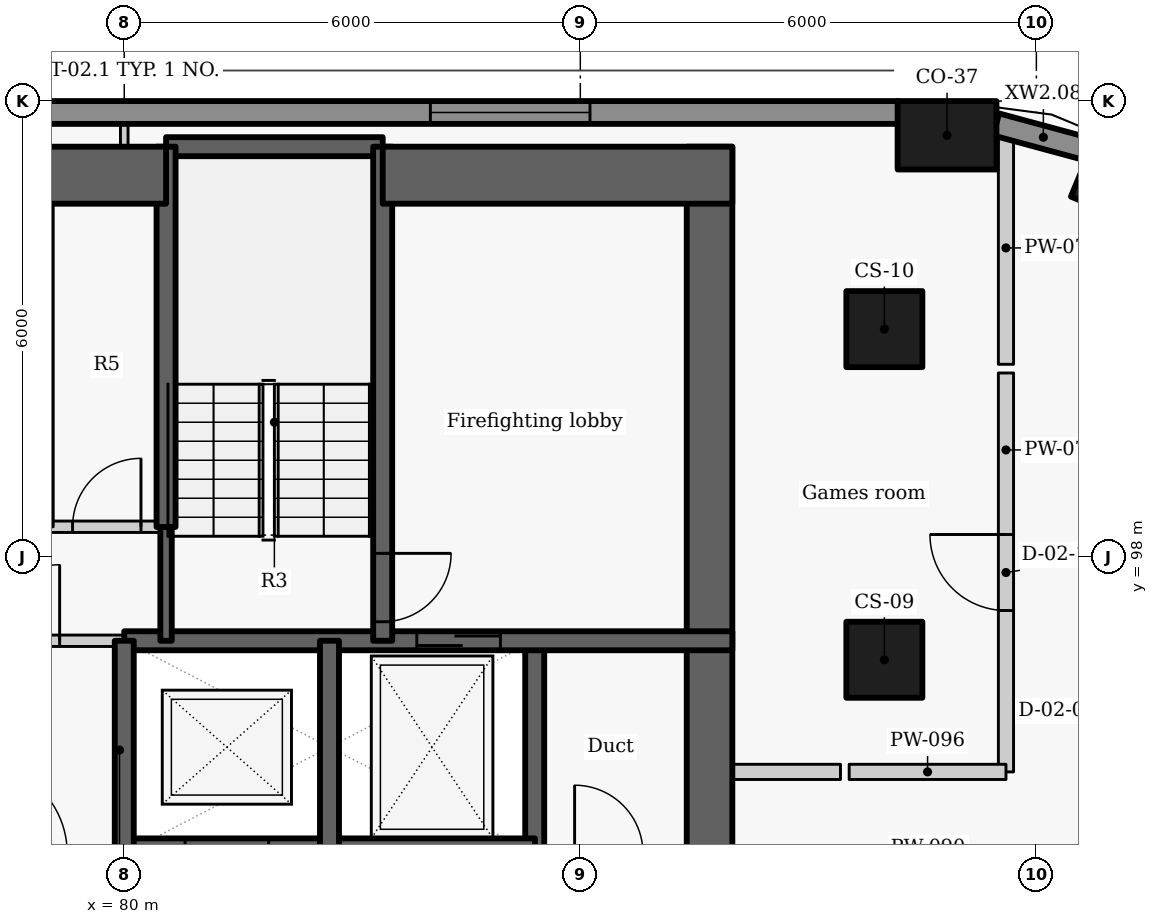
"""IFC4 building model, lengths in metres.
Left out: names, types, materials, properties, quantities, classifications, styles, units other than length and angle.
Written with IfcOpenShell. Run it as: python <this file> out.ifc"""

import sys

from ifc_helpers import new_model, si_unit, direction, frame, frame_2d, origin, origin_2d, place, context, subcontext, project, spatial, rectangle, extrude, element, fill, save


model = new_model("IFC4")
c1 = context("Model", 3, precision=1e-05, world=origin(), true_north=direction((0.0, 1.0)))
c2 = subcontext(c1, "Body", "Model", "MODEL_VIEW")
j1 = project(units=[si_unit("LENGTHUNIT", "METRE"), si_unit("PLANEANGLEUNIT", "RADIAN")], contexts=[c1])
p1 = place(None, origin())
s1 = spatial("IfcSite", under=j1, at=p1, CompositionType="ELEMENT")
p2 = place(p1, origin())
s2 = spatial("IfcBuilding", under=s1, at=p2, CompositionType="ELEMENT")
p3 = place(p2, frame((0.0, 0.0, 150.3)))
s3 = spatial("IfcBuildingStorey", under=s2, at=p3, CompositionType="ELEMENT", Elevation=150.3)
for number, where, z_axis, x_axis in (
    (1, (93.227, 102.91, 0.0), (0.0, 0.0, 1.0), (-0.924, 0.383, 0.0)),
    (2, (90.825, 103.55, 0.0), (0.0, 0.0, 1.0), (-1.0, 0.0, 0.0)),
):
    element("IfcColumn", number, at=place(p3, frame(where, z_axis=z_axis, x_axis=x_axis)), inside=s3, PredefinedType="COLUMN", context=c2, shape_type="SweptSolid", body=[
        extrude(rectangle(XDim=1.3, YDim=0.9, at=origin_2d()), origin(), (0.0, 0.0, 1.0), 3.3),
    ])
for number, where, z_axis, x_axis in (
    (3, (90.0, 96.65, 0.0), (0.0, 0.0, 1.0), (0.0, 1.0, 0.0)),
    (4, (90.0, 101.0, 0.0), (0.0, 0.0, 1.0), (0.0, 1.0, 0.0)),
):
    element("IfcColumn", number, at=place(p3, frame(where, z_axis=z_axis, x_axis=x_axis)), inside=s3, PredefinedType="COLUMN", context=c2, shape_type="SweptSolid", body=[
        extrude(rectangle(XDim=1.0, YDim=1.0, at=origin_2d()), origin(), (0.0, 0.0, 1.0), 3.3),
    ])
p4 = place(p3, frame((92.713, 103.356, 0.0), z_axis=(0.0, 0.0, 1.0), x_axis=(-0.965274225809, 0.26123872031, 0.0)))
e5 = element("IfcWall", 5, at=p4, inside=s3, PredefinedType="SOLIDWALL", context=c2, shape_type="SweptSolid", body=[
    extrude(rectangle(XDim=1.287, YDim=0.3, at=frame_2d((0.644, 0.0))), origin(), (0.0, 0.0, 1.0), 2.425),
])
p5 = place(p3, frame((90.179, 103.85, 0.0), z_axis=(0.0, 0.0, 1.0), x_axis=(-1.0, 0.0, 0.0)))
e6 = element("IfcWall", 6, at=p5, inside=s3, PredefinedType="SOLIDWALL", context=c2, shape_type="SweptSolid", body=[
    extrude(rectangle(XDim=20.391, YDim=0.3, at=frame_2d((10.196, 0.0))), origin(), (0.0, 0.0, 1.0), 2.425),
])
p6 = place(p5, frame((4.051, 0.0, 0.9)))
e7 = element("IfcOpeningElement", 7, at=p6, cuts=e6, PredefinedType="OPENING", context=c2, shape_type="SweptSolid", body=[
    extrude(rectangle(XDim=2.1, YDim=1.1, at=frame_2d((1.05, 0.55))), frame((0.0, 0.16, 0.0), z_axis=(0.0, -1.0, 0.0), x_axis=(1.0, 0.0, 0.0)), (0.0, 0.0, 1.0), 0.32),
])
p7 = place(p5, frame((14.212, 0.0, 0.9)))
e8 = element("IfcOpeningElement", 8, at=p7, cuts=e6, PredefinedType="OPENING", context=c2, shape_type="SweptSolid", body=[
    extrude(rectangle(XDim=2.1, YDim=1.1, at=frame_2d((1.05, 0.55))), frame((0.0, 0.16, 0.0), z_axis=(0.0, -1.0, 0.0), x_axis=(1.0, 0.0, 0.0)), (0.0, 0.0, 1.0), 0.32),
])
p8 = place(p3, frame((85.4, 94.1, -0.275), z_axis=(0.0, 0.0, 1.0), x_axis=(0.0, 1.0, 0.0)))
e9 = element("IfcWall", 9, at=p8, inside=s3, PredefinedType="SHEAR", context=c2, shape_type="SweptSolid", body=[
    extrude(rectangle(XDim=2.8, YDim=0.25, at=frame_2d((1.4, 0.0))), origin(), (0.0, 0.0, 1.0), 3.3),
])
p9 = place(p3, frame((87.7, 103.4, -0.275), z_axis=(0.0, 0.0, 1.0), x_axis=(0.0, -1.0, 0.0)))
e10 = element("IfcWall", 10, at=p9, inside=s3, PredefinedType="SHEAR", context=c2, shape_type="SweptSolid", body=[
    extrude(rectangle(XDim=15.6, YDim=0.6, at=frame_2d((7.8, 0.0))), origin(), (0.0, 0.0, 1.0), 3.3),
])
p10 = place(p9, frame((10.248, 0.0, 0.275)))
e11 = element("IfcOpeningElement", 11, at=p10, cuts=e10, PredefinedType="OPENING", context=c2, shape_type="SweptSolid", body=[
    extrude(rectangle(XDim=1.5, YDim=2.1, at=frame_2d((0.75, 1.05))), frame((0.0, 0.31, 0.0), z_axis=(0.0, -1.0, 0.0), x_axis=(1.0, 0.0, 0.0)), (0.0, 0.0, 1.0), 0.62),
])
p11 = place(p3, frame((79.997, 94.1, -0.275), z_axis=(0.0, 0.0, 1.0), x_axis=(1.0, 0.0, 0.0)))
e12 = element("IfcWall", 12, at=p11, inside=s3, PredefinedType="SHEAR", context=c2, shape_type="SweptSolid", body=[
    extrude(rectangle(XDim=5.406, YDim=0.4, at=frame_2d((2.703, 0.0))), origin(), (0.0, 0.0, 1.0), 3.3),
])
p12 = place(p11, frame((0.803, 0.0, 0.275)))
e13 = element("IfcOpeningElement", 13, at=p12, cuts=e12, PredefinedType="OPENING", context=c2, shape_type="SweptSolid", body=[
    extrude(rectangle(XDim=1.1, YDim=2.1, at=frame_2d((0.55, 1.05))), frame((0.0, 0.21, 0.0), z_axis=(0.0, -1.0, 0.0), x_axis=(1.0, 0.0, 0.0)), (0.0, 0.0, 1.0), 0.42),
])
p13 = place(p3, frame((80.0, 96.9, -0.275), z_axis=(0.0, 0.0, 1.0), x_axis=(1.0, 0.0, 0.0)))
e14 = element("IfcWall", 14, at=p13, inside=s3, PredefinedType="SHEAR", context=c2, shape_type="SweptSolid", body=[
    extrude(rectangle(XDim=8.0, YDim=0.25, at=frame_2d((4.0, 0.0))), origin(), (0.0, 0.0, 1.0), 3.3),
])
p14 = place(p13, frame((3.849, 0.0, 0.275)))
e15 = element("IfcOpeningElement", 15, at=p14, cuts=e14, PredefinedType="OPENING", context=c2, shape_type="SweptSolid", body=[
    extrude(rectangle(XDim=1.1, YDim=2.1, at=frame_2d((0.55, 1.05))), frame((0.0, 0.135, 0.0), z_axis=(0.0, -1.0, 0.0), x_axis=(1.0, 0.0, 0.0)), (0.0, 0.0, 1.0), 0.27),
])
p15 = place(p3, frame((80.0, 94.1, -0.275), z_axis=(0.0, 0.0, 1.0), x_axis=(0.0, 1.0, 0.0)))
e16 = element("IfcWall", 16, at=p15, inside=s3, PredefinedType="SHEAR", context=c2, shape_type="SweptSolid", body=[
    extrude(rectangle(XDim=2.8, YDim=0.25, at=frame_2d((1.4, 0.0))), origin(), (0.0, 0.0, 1.0), 3.3),
])
p16 = place(p3, frame((77.3, 96.9, 0.0), z_axis=(0.0, 0.0, 1.0), x_axis=(1.0, 0.0, 0.0)))
e17 = element("IfcWall", 17, at=p16, inside=s3, PredefinedType="PARTITIONING", context=c2, shape_type="SweptSolid", body=[
    extrude(rectangle(XDim=2.7, YDim=0.15, at=frame_2d((1.35, 0.0))), origin(), (0.0, 0.0, 1.0), 3.025),
])
p17 = place(p16, frame((0.85, 0.0, 0.0)))
e18 = element("IfcOpeningElement", 18, at=p17, cuts=e17, PredefinedType="OPENING", context=c2, shape_type="SweptSolid", body=[
    extrude(rectangle(XDim=1.0, YDim=2.1, at=frame_2d((0.5, 1.05))), frame((0.0, 0.085, 0.0), z_axis=(0.0, -1.0, 0.0), x_axis=(1.0, 0.0, 0.0)), (0.0, 0.0, 1.0), 0.17),
])
p18 = place(p3, frame((82.7, 94.1, -0.275), z_axis=(0.0, 0.0, 1.0), x_axis=(0.0, 1.0, 0.0)))
e19 = element("IfcWall", 19, at=p18, inside=s3, PredefinedType="SHEAR", context=c2, shape_type="SweptSolid", body=[
    extrude(rectangle(XDim=2.8, YDim=0.25, at=frame_2d((1.4, 0.0))), origin(), (0.0, 0.0, 1.0), 3.3),
])
p19 = place(p3, frame((80.55, 103.4, -0.275), z_axis=(0.0, 0.0, 1.0), x_axis=(1.0, 0.0, 0.0)))
e20 = element("IfcWall", 20, at=p19, inside=s3, PredefinedType="SHEAR", context=c2, shape_type="SweptSolid", body=[
    extrude(rectangle(XDim=2.85, YDim=0.25, at=frame_2d((1.425, 0.0))), origin(), (0.0, 0.0, 1.0), 3.3),
])
p20 = place(p3, frame((83.4, 103.4, -0.275), z_axis=(0.0, 0.0, 1.0), x_axis=(0.0, -1.0, 0.0)))
e21 = element("IfcWall", 21, at=p20, inside=s3, PredefinedType="SHEAR", context=c2, shape_type="SweptSolid", body=[
    extrude(rectangle(XDim=6.5, YDim=0.25, at=frame_2d((3.25, 0.0))), origin(), (0.0, 0.0, 1.0), 3.3),
])
p21 = place(p20, frame((5.35, 0.0, 0.275)))
e22 = element("IfcOpeningElement", 22, at=p21, cuts=e21, PredefinedType="OPENING", context=c2, shape_type="SweptSolid", body=[
    extrude(rectangle(XDim=0.9, YDim=2.1, at=frame_2d((0.45, 1.05))), frame((0.0, 0.135, 0.0), z_axis=(0.0, -1.0, 0.0), x_axis=(1.0, 0.0, 0.0)), (0.0, 0.0, 1.0), 0.27),
])
p22 = place(p3, frame((80.55, 96.9, -0.275), z_axis=(0.0, 0.0, 1.0), x_axis=(0.0, 1.0, 0.0)))
e23 = element("IfcWall", 23, at=p22, inside=s3, PredefinedType="SHEAR", context=c2, shape_type="SweptSolid", body=[
    extrude(rectangle(XDim=1.503, YDim=0.15, at=frame_2d((0.751, 0.0))), origin(), (0.0, 0.0, 1.0), 3.3),
])
p23 = place(p3, frame((80.55, 98.397, -0.275), z_axis=(0.0, 0.0, 1.0), x_axis=(0.0, 1.0, 0.0)))
e24 = element("IfcWall", 24, at=p23, inside=s3, PredefinedType="SHEAR", context=c2, shape_type="SweptSolid", body=[
    extrude(rectangle(XDim=5.003, YDim=0.25, at=frame_2d((2.501, 0.0))), origin(), (0.0, 0.0, 1.0), 3.3),
])
p24 = place(p3, frame((75.35, 103.025, -0.275), z_axis=(0.0, 0.0, 1.0), x_axis=(1.0, 0.0, 0.0)))
e25 = element("IfcWall", 25, at=p24, inside=s3, PredefinedType="SHEAR", context=c2, shape_type="SweptSolid", body=[
    extrude(rectangle(XDim=5.2, YDim=0.75, at=frame_2d((2.6, 0.0))), origin(), (0.0, 0.0, 1.0), 3.3),
])
p25 = place(p3, frame((83.4, 103.025, -0.275), z_axis=(0.0, 0.0, 1.0), x_axis=(1.0, 0.0, 0.0)))
e26 = element("IfcWall", 26, at=p25, inside=s3, PredefinedType="SHEAR", context=c2, shape_type="SweptSolid", body=[
    extrude(rectangle(XDim=4.6, YDim=0.75, at=frame_2d((2.3, 0.0))), origin(), (0.0, 0.0, 1.0), 3.3),
])
p26 = place(p3, frame((75.35, 98.4, 0.0), z_axis=(0.0, 0.0, 1.0), x_axis=(1.0, 0.0, 0.0)))
e27 = element("IfcWall", 27, at=p26, inside=s3, PredefinedType="PARTITIONING", context=c2, shape_type="SweptSolid", body=[
    extrude(rectangle(XDim=5.2, YDim=0.15, at=frame_2d((2.6, 0.0))), origin(), (0.0, 0.0, 1.0), 3.025),
])
p27 = place(p26, frame((1.37, 0.0, 0.0)))
e28 = element("IfcOpeningElement", 28, at=p27, cuts=e27, PredefinedType="OPENING", context=c2, shape_type="SweptSolid", body=[
    extrude(rectangle(XDim=0.9, YDim=2.1, at=frame_2d((0.45, 1.05))), frame((0.0, 0.085, 0.0), z_axis=(0.0, -1.0, 0.0), x_axis=(1.0, 0.0, 0.0)), (0.0, 0.0, 1.0), 0.17),
])
p28 = place(p26, frame((3.97, 0.0, 0.0)))
e29 = element("IfcOpeningElement", 29, at=p28, cuts=e27, PredefinedType="OPENING", context=c2, shape_type="SweptSolid", body=[
    extrude(rectangle(XDim=0.9, YDim=2.1, at=frame_2d((0.45, 1.05))), frame((0.0, 0.085, 0.0), z_axis=(0.0, -1.0, 0.0), x_axis=(1.0, 0.0, 0.0)), (0.0, 0.0, 1.0), 0.17),
])
p29 = place(p3, frame((78.99, 98.4, 0.0), z_axis=(0.0, 0.0, 1.0), x_axis=(0.0, 1.0, 0.0)))
e30 = element("IfcWall", 30, at=p29, inside=s3, PredefinedType="PARTITIONING", context=c2, shape_type="SweptSolid", body=[
    extrude(rectangle(XDim=5.0, YDim=0.15, at=frame_2d((2.5, 0.0))), origin(), (0.0, 0.0, 1.0), 3.025),
])
p30 = place(p3, frame((91.6, 95.175, 0.0), z_axis=(0.0, 0.0, 1.0), x_axis=(0.0, 1.0, 0.0)))
e31 = element("IfcWall", 31, at=p30, inside=s3, PredefinedType="PARTITIONING", context=c2, shape_type="SweptSolid", body=[
    extrude(rectangle(XDim=5.248, YDim=0.2, at=frame_2d((2.624, 0.0))), origin(), (0.0, 0.0, 1.0), 3.025),
])
p31 = place(p30, frame((2.123, 0.0, 0.0)))
e32 = element("IfcOpeningElement", 32, at=p31, cuts=e31, PredefinedType="OPENING", context=c2, shape_type="SweptSolid", body=[
    extrude(rectangle(XDim=1.0, YDim=2.1, at=frame_2d((0.5, 1.05))), frame((0.0, 0.11, 0.0), z_axis=(0.0, -1.0, 0.0), x_axis=(1.0, 0.0, 0.0)), (0.0, 0.0, 1.0), 0.22),
])
p32 = place(p3, frame((91.6, 100.537, 0.0), z_axis=(0.0, 0.0, 1.0), x_axis=(0.0, 1.0, 0.0)))
e33 = element("IfcWall", 33, at=p32, inside=s3, PredefinedType="PARTITIONING", context=c2, shape_type="SweptSolid", body=[
    extrude(rectangle(XDim=3.062, YDim=0.2, at=frame_2d((1.531, 0.0))), origin(), (0.0, 0.0, 1.0), 2.405),
])
p33 = place(p3, frame((88.0, 95.175, 0.0), z_axis=(0.0, 0.0, 1.0), x_axis=(1.0, 0.0, 0.0)))
e34 = element("IfcWall", 34, at=p33, inside=s3, PredefinedType="PARTITIONING", context=c2, shape_type="SweptSolid", body=[
    extrude(rectangle(XDim=1.423, YDim=0.2, at=frame_2d((0.711, 0.0))), origin(), (0.0, 0.0, 1.0), 3.025),
])
p34 = place(p3, frame((89.537, 95.175, 0.0), z_axis=(0.0, 0.0, 1.0), x_axis=(1.0, 0.0, 0.0)))
e35 = element("IfcWall", 35, at=p34, inside=s3, PredefinedType="PARTITIONING", context=c2, shape_type="SweptSolid", body=[
    extrude(rectangle(XDim=2.063, YDim=0.2, at=frame_2d((1.031, 0.0))), origin(), (0.0, 0.0, 1.0), 2.505),
])
p35 = place(p3, frame((80.0, 103.4, 0.0), z_axis=(0.0, 0.0, 1.0), x_axis=(0.0, 1.0, 0.0)))
e36 = element("IfcWall", 36, at=p35, inside=s3, PredefinedType="PARTITIONING", context=c2, shape_type="SweptSolid", body=[
    extrude(rectangle(XDim=0.3, YDim=0.1, at=frame_2d((0.15, 0.0))), origin(), (0.0, 0.0, 1.0), 3.025),
])
p36 = place(p6, origin())
e37 = element("IfcWindow", 37, at=p36, inside=s3, PartitioningType="SINGLE_PANEL", PredefinedType="WINDOW", context=c2, shape_type="SweptSolid", body=[
    extrude(rectangle(XDim=2.1, YDim=1.1, at=frame_2d((1.05, 0.55))), frame((0.0, 0.03, 0.0), z_axis=(0.0, -1.0, 0.0), x_axis=(1.0, 0.0, 0.0)), (0.0, 0.0, 1.0), 0.06),
])
fill(e7, e37)
p37 = place(p14, origin())
e38 = element("IfcDoor", 38, at=p37, inside=s3, OperationType="SLIDING_TO_LEFT", PredefinedType="DOOR", context=c2, shape_type="SweptSolid", body=[
    extrude(rectangle(XDim=1.1, YDim=2.1, at=frame_2d((0.55, 1.05))), frame((0.0, 0.025, 0.0), z_axis=(0.0, -1.0, 0.0), x_axis=(1.0, 0.0, 0.0)), (0.0, 0.0, 1.0), 0.05),
])
fill(e15, e38)
p38 = place(p17, origin())
e39 = element("IfcDoor", 39, at=p38, inside=s3, OperationType="SINGLE_SWING_RIGHT", PredefinedType="DOOR", context=c2, shape_type="SweptSolid", body=[
    extrude(rectangle(XDim=1.0, YDim=2.1, at=frame_2d((0.5, 1.05))), frame((0.0, 0.025, 0.0), z_axis=(0.0, -1.0, 0.0), x_axis=(1.0, 0.0, 0.0)), (0.0, 0.0, 1.0), 0.05),
])
fill(e18, e39)
p39 = place(p28, origin())
e40 = element("IfcDoor", 40, at=p39, inside=s3, OperationType="SINGLE_SWING_RIGHT", PredefinedType="DOOR", context=c2, shape_type="SweptSolid", body=[
    extrude(rectangle(XDim=0.9, YDim=2.1, at=frame_2d((0.45, 1.05))), frame((0.0, 0.025, 0.0), z_axis=(0.0, -1.0, 0.0), x_axis=(1.0, 0.0, 0.0)), (0.0, 0.0, 1.0), 0.05),
])
fill(e29, e40)
p40 = place(p21, origin())
e41 = element("IfcDoor", 41, at=p40, inside=s3, OperationType="SINGLE_SWING_LEFT", PredefinedType="DOOR", context=c2, shape_type="SweptSolid", body=[
    extrude(rectangle(XDim=0.9, YDim=2.1, at=frame_2d((0.45, 1.05))), frame((0.0, 0.025, 0.0), z_axis=(0.0, -1.0, 0.0), x_axis=(1.0, 0.0, 0.0)), (0.0, 0.0, 1.0), 0.05),
])
fill(e22, e41)
p41 = place(p31, origin())
e42 = element("IfcDoor", 42, at=p41, inside=s3, OperationType="SINGLE_SWING_RIGHT", PredefinedType="DOOR", context=c2, shape_type="SweptSolid", body=[
    extrude(rectangle(XDim=1.0, YDim=2.1, at=frame_2d((0.5, 1.05))), frame((0.0, 0.025, 0.0), z_axis=(0.0, -1.0, 0.0), x_axis=(1.0, 0.0, 0.0)), (0.0, 0.0, 1.0), 0.05),
])
fill(e32, e42)
save(model, sys.argv[1])
